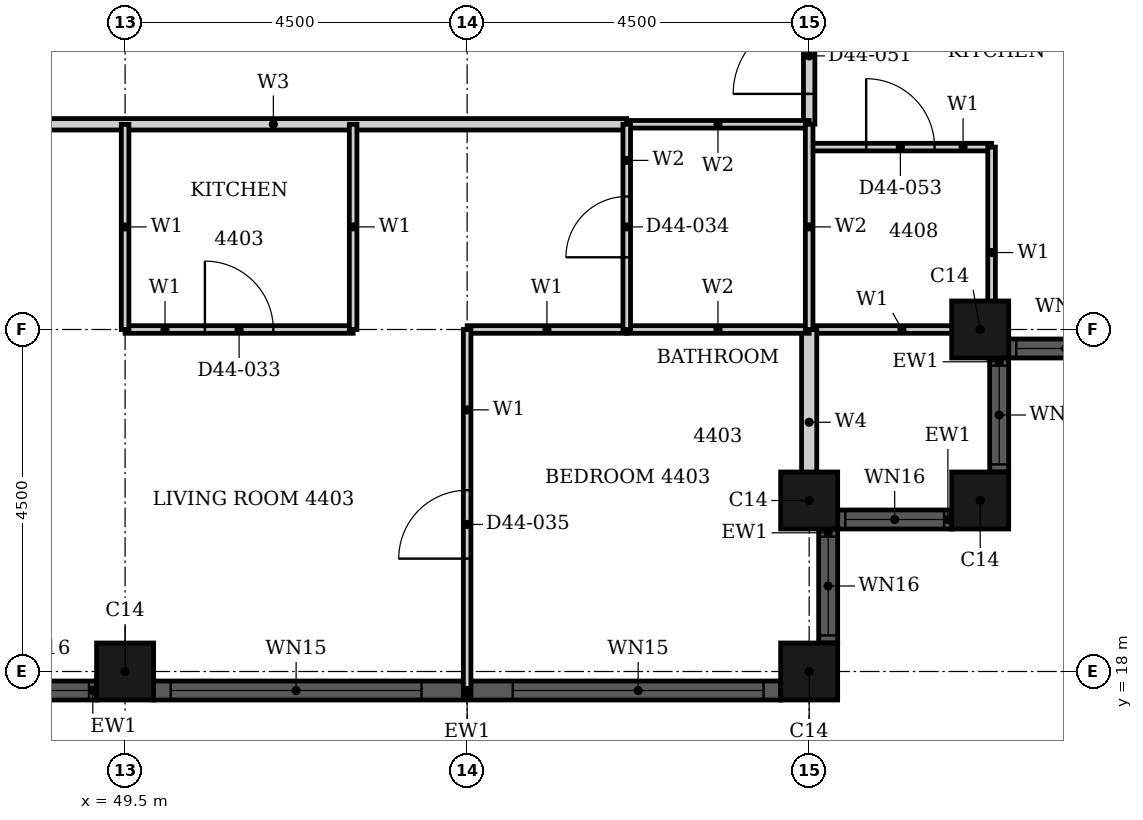
"""IFC4 building model, lengths in metres.
Left out: names, types, materials, properties, quantities, classifications, styles, units other than length and angle.
Written with IfcOpenShell. Run it as: python <this file> out.ifc"""

import sys

from ifc_helpers import new_model, si_unit, direction, frame, frame_2d, origin, origin_2d, place, context, subcontext, project, spatial, rectangle, hollow_rectangle, extrude, element, fill, save


model = new_model("IFC4")
c1 = context("Model", 3, precision=1e-05, world=origin(), true_north=direction((0.0, 1.0)))
c2 = subcontext(c1, "Body", "Model", "MODEL_VIEW")
j1 = project(units=[si_unit("LENGTHUNIT", "METRE"), si_unit("PLANEANGLEUNIT", "RADIAN")], contexts=[c1])
p1 = place(None, origin())
s1 = spatial("IfcSite", under=j1, at=p1, CompositionType="ELEMENT")
p2 = place(p1, origin())
s2 = spatial("IfcBuilding", under=s1, at=p2, CompositionType="ELEMENT")
p3 = place(p2, frame((0.0, 0.0, 176.5)))
s3 = spatial("IfcBuildingStorey", under=s2, at=p3, CompositionType="ELEMENT", Elevation=176.5)
for number, where, z_axis, x_axis in (
    (1, (49.5, 18.0, 0.0), (0.0, 0.0, 1.0), (1.0, 0.0, 0.0)),
    (2, (58.5, 18.0, 0.0), (0.0, 0.0, 1.0), (1.0, 0.0, 0.0)),
    (3, (58.5, 20.25, 0.0), (0.0, 0.0, 1.0), (1.0, 0.0, 0.0)),
    (4, (60.75, 20.25, 0.0), (0.0, 0.0, 1.0), (1.0, 0.0, 0.0)),
    (5, (60.75, 22.5, 0.0), (0.0, 0.0, 1.0), (1.0, 0.0, 0.0)),
):
    element("IfcColumn", number, at=place(p3, frame(where, z_axis=z_axis, x_axis=x_axis)), inside=s3, PredefinedType="COLUMN", context=c2, shape_type="SweptSolid", body=[
        extrude(hollow_rectangle(XDim=0.75, YDim=0.75, WallThickness=0.024, at=origin_2d()), origin(), (0.0, 0.0, 1.0), 3.7),
    ])
p4 = place(p3, frame((47.625, 17.75, 0.0), z_axis=(0.0, 0.0, 1.0), x_axis=(1.0, 0.0, 0.0)))
e6 = element("IfcWall", 6, at=p4, inside=s3, PredefinedType="SOLIDWALL", context=c2, shape_type="SweptSolid", body=[
    extrude(rectangle(XDim=1.5, YDim=0.25, at=frame_2d((0.75, 0.0))), origin(), (0.0, 0.0, 1.0), 3.7),
])
p5 = place(p4, frame((0.1, 0.0, 0.9)))
e7 = element("IfcOpeningElement", 7, at=p5, cuts=e6, PredefinedType="OPENING", context=c2, shape_type="SweptSolid", body=[
    extrude(rectangle(XDim=1.3, YDim=1.85, at=frame_2d((0.65, 0.925))), frame((0.0, 0.135, 0.0), z_axis=(0.0, -1.0, 0.0), x_axis=(1.0, 0.0, 0.0)), (0.0, 0.0, 1.0), 0.27),
])
p6 = place(p3, frame((49.875, 17.75, 0.0), z_axis=(0.0, 0.0, 1.0), x_axis=(1.0, 0.0, 0.0)))
e8 = element("IfcWall", 8, at=p6, inside=s3, PredefinedType="SOLIDWALL", context=c2, shape_type="SweptSolid", body=[
    extrude(rectangle(XDim=8.25, YDim=0.25, at=frame_2d((4.125, 0.0))), origin(), (0.0, 0.0, 1.0), 3.7),
])
p7 = place(p6, frame((0.225, 0.0, 0.45)))
e9 = element("IfcOpeningElement", 9, at=p7, cuts=e8, PredefinedType="OPENING", context=c2, shape_type="SweptSolid", body=[
    extrude(rectangle(XDim=3.3, YDim=2.3, at=frame_2d((1.65, 1.15))), frame((0.0, 0.135, 0.0), z_axis=(0.0, -1.0, 0.0), x_axis=(1.0, 0.0, 0.0)), (0.0, 0.0, 1.0), 0.27),
])
p8 = place(p6, frame((4.725, 0.0, 0.45)))
e10 = element("IfcOpeningElement", 10, at=p8, cuts=e8, PredefinedType="OPENING", context=c2, shape_type="SweptSolid", body=[
    extrude(rectangle(XDim=3.3, YDim=2.3, at=frame_2d((1.65, 1.15))), frame((0.0, 0.135, 0.0), z_axis=(0.0, -1.0, 0.0), x_axis=(1.0, 0.0, 0.0)), (0.0, 0.0, 1.0), 0.27),
])
p9 = place(p3, frame((58.75, 18.375, 0.0), z_axis=(0.0, 0.0, 1.0), x_axis=(0.0, 1.0, 0.0)))
e11 = element("IfcWall", 11, at=p9, inside=s3, PredefinedType="SOLIDWALL", context=c2, shape_type="SweptSolid", body=[
    extrude(rectangle(XDim=1.5, YDim=0.25, at=frame_2d((0.75, 0.0))), origin(), (0.0, 0.0, 1.0), 3.7),
])
p10 = place(p9, frame((0.1, 0.0, 0.9)))
e12 = element("IfcOpeningElement", 12, at=p10, cuts=e11, PredefinedType="OPENING", context=c2, shape_type="SweptSolid", body=[
    extrude(rectangle(XDim=1.3, YDim=1.85, at=frame_2d((0.65, 0.925))), frame((0.0, 0.135, 0.0), z_axis=(0.0, -1.0, 0.0), x_axis=(1.0, 0.0, 0.0)), (0.0, 0.0, 1.0), 0.27),
])
p11 = place(p3, frame((58.875, 20.0, 0.0), z_axis=(0.0, 0.0, 1.0), x_axis=(1.0, 0.0, 0.0)))
e13 = element("IfcWall", 13, at=p11, inside=s3, PredefinedType="SOLIDWALL", context=c2, shape_type="SweptSolid", body=[
    extrude(rectangle(XDim=1.5, YDim=0.25, at=frame_2d((0.75, 0.0))), origin(), (0.0, 0.0, 1.0), 3.7),
])
p12 = place(p11, frame((0.1, 0.0, 0.9)))
e14 = element("IfcOpeningElement", 14, at=p12, cuts=e13, PredefinedType="OPENING", context=c2, shape_type="SweptSolid", body=[
    extrude(rectangle(XDim=1.3, YDim=1.85, at=frame_2d((0.65, 0.925))), frame((0.0, 0.135, 0.0), z_axis=(0.0, -1.0, 0.0), x_axis=(1.0, 0.0, 0.0)), (0.0, 0.0, 1.0), 0.27),
])
p13 = place(p3, frame((61.0, 20.625, 0.0), z_axis=(0.0, 0.0, 1.0), x_axis=(0.0, 1.0, 0.0)))
e15 = element("IfcWall", 15, at=p13, inside=s3, PredefinedType="SOLIDWALL", context=c2, shape_type="SweptSolid", body=[
    extrude(rectangle(XDim=1.5, YDim=0.25, at=frame_2d((0.75, 0.0))), origin(), (0.0, 0.0, 1.0), 3.7),
])
p14 = place(p13, frame((0.1, 0.0, 0.9)))
e16 = element("IfcOpeningElement", 16, at=p14, cuts=e15, PredefinedType="OPENING", context=c2, shape_type="SweptSolid", body=[
    extrude(rectangle(XDim=1.3, YDim=1.85, at=frame_2d((0.65, 0.925))), frame((0.0, 0.135, 0.0), z_axis=(0.0, -1.0, 0.0), x_axis=(1.0, 0.0, 0.0)), (0.0, 0.0, 1.0), 0.27),
])
p15 = place(p3, frame((61.125, 22.25, 0.0), z_axis=(0.0, 0.0, 1.0), x_axis=(1.0, 0.0, 0.0)))
e17 = element("IfcWall", 17, at=p15, inside=s3, PredefinedType="SOLIDWALL", context=c2, shape_type="SweptSolid", body=[
    extrude(rectangle(XDim=1.5, YDim=0.25, at=frame_2d((0.75, 0.0))), origin(), (0.0, 0.0, 1.0), 3.7),
])
p16 = place(p15, frame((0.1, 0.0, 0.9)))
e18 = element("IfcOpeningElement", 18, at=p16, cuts=e17, PredefinedType="OPENING", context=c2, shape_type="SweptSolid", body=[
    extrude(rectangle(XDim=1.3, YDim=1.85, at=frame_2d((0.65, 0.925))), frame((0.0, 0.135, 0.0), z_axis=(0.0, -1.0, 0.0), x_axis=(1.0, 0.0, 0.0)), (0.0, 0.0, 1.0), 0.27),
])
p17 = place(p3, frame((46.801, 25.2, 0.0), z_axis=(0.0, 0.0, 1.0), x_axis=(1.0, 0.0, 0.0)))
e19 = element("IfcWall", 19, at=p17, inside=s3, PredefinedType="PARTITIONING", context=c2, shape_type="SweptSolid", body=[
    extrude(rectangle(XDim=9.299, YDim=0.15, at=frame_2d((4.649, 0.0))), origin(), (0.0, 0.0, 1.0), 3.4),
])
p18 = place(p3, frame((58.5, 25.2, 0.0), z_axis=(0.0, 0.0, 1.0), x_axis=(0.0, 1.0, 0.0)))
e20 = element("IfcWall", 20, at=p18, inside=s3, PredefinedType="PARTITIONING", context=c2, shape_type="SweptSolid", body=[
    extrude(rectangle(XDim=1.8, YDim=0.15, at=frame_2d((0.9, 0.0))), origin(), (0.0, 0.0, 1.0), 3.4),
])
p19 = place(p18, frame((0.4, 0.0, 0.0)))
e21 = element("IfcOpeningElement", 21, at=p19, cuts=e20, PredefinedType="OPENING", context=c2, shape_type="SweptSolid", body=[
    extrude(rectangle(XDim=1.0, YDim=2.2, at=frame_2d((0.5, 1.1))), frame((0.0, 0.085, 0.0), z_axis=(0.0, -1.0, 0.0), x_axis=(1.0, 0.0, 0.0)), (0.0, 0.0, 1.0), 0.17),
])
p20 = place(p3, frame((54.0, 22.5, 0.0), z_axis=(0.0, 0.0, 1.0), x_axis=(1.0, 0.0, 0.0)))
e22 = element("IfcWall", 22, at=p20, inside=s3, PredefinedType="PARTITIONING", context=c2, shape_type="SweptSolid", body=[
    extrude(rectangle(XDim=2.1, YDim=0.1, at=frame_2d((1.05, 0.0))), origin(), (0.0, 0.0, 1.0), 2.68),
])
p21 = place(p3, frame((49.5, 22.5, 0.0), z_axis=(0.0, 0.0, 1.0), x_axis=(1.0, 0.0, 0.0)))
e23 = element("IfcWall", 23, at=p21, inside=s3, PredefinedType="PARTITIONING", context=c2, shape_type="SweptSolid", body=[
    extrude(rectangle(XDim=3.0, YDim=0.1, at=frame_2d((1.5, 0.0))), origin(), (0.0, 0.0, 1.0), 2.68),
])
p22 = place(p21, frame((1.05, 0.0, 0.0)))
e24 = element("IfcOpeningElement", 24, at=p22, cuts=e23, PredefinedType="OPENING", context=c2, shape_type="SweptSolid", body=[
    extrude(rectangle(XDim=0.9, YDim=2.1, at=frame_2d((0.45, 1.05))), frame((0.0, 0.06, 0.0), z_axis=(0.0, -1.0, 0.0), x_axis=(1.0, 0.0, 0.0)), (0.0, 0.0, 1.0), 0.12),
])
p23 = place(p3, frame((58.501, 22.5, 0.0), z_axis=(0.0, 0.0, 1.0), x_axis=(1.0, 0.0, 0.0)))
e25 = element("IfcWall", 25, at=p23, inside=s3, PredefinedType="PARTITIONING", context=c2, shape_type="SweptSolid", body=[
    extrude(rectangle(XDim=2.439, YDim=0.1, at=frame_2d((1.219, 0.0))), origin(), (0.0, 0.0, 1.0), 2.68),
])
p24 = place(p3, frame((58.5, 24.9, 0.0), z_axis=(0.0, 0.0, 1.0), x_axis=(1.0, 0.0, 0.0)))
e26 = element("IfcWall", 26, at=p24, inside=s3, PredefinedType="PARTITIONING", context=c2, shape_type="SweptSolid", body=[
    extrude(rectangle(XDim=2.4, YDim=0.1, at=frame_2d((1.2, 0.0))), origin(), (0.0, 0.0, 1.0), 3.4),
])
p25 = place(p24, frame((0.75, 0.0, 0.0)))
e27 = element("IfcOpeningElement", 27, at=p25, cuts=e26, PredefinedType="OPENING", context=c2, shape_type="SweptSolid", body=[
    extrude(rectangle(XDim=0.9, YDim=2.1, at=frame_2d((0.45, 1.05))), frame((0.0, 0.06, 0.0), z_axis=(0.0, -1.0, 0.0), x_axis=(1.0, 0.0, 0.0)), (0.0, 0.0, 1.0), 0.12),
])
p26 = place(p3, frame((49.5, 22.5, 0.0), z_axis=(0.0, 0.0, 1.0), x_axis=(0.0, 1.0, 0.0)))
e28 = element("IfcWall", 28, at=p26, inside=s3, PredefinedType="PARTITIONING", context=c2, shape_type="SweptSolid", body=[
    extrude(rectangle(XDim=2.699, YDim=0.1, at=frame_2d((1.35, 0.0))), origin(), (0.0, 0.0, 1.0), 2.48),
])
p27 = place(p3, frame((52.5, 22.5, 0.0), z_axis=(0.0, 0.0, 1.0), x_axis=(0.0, 1.0, 0.0)))
e29 = element("IfcWall", 29, at=p27, inside=s3, PredefinedType="PARTITIONING", context=c2, shape_type="SweptSolid", body=[
    extrude(rectangle(XDim=2.7, YDim=0.1, at=frame_2d((1.35, 0.0))), origin(), (0.0, 0.0, 1.0), 3.4),
])
p28 = place(p3, frame((54.0, 17.685, 0.0), z_axis=(0.0, 0.0, 1.0), x_axis=(0.0, 1.0, 0.0)))
e30 = element("IfcWall", 30, at=p28, inside=s3, PredefinedType="PARTITIONING", context=c2, shape_type="SweptSolid", body=[
    extrude(rectangle(XDim=4.815, YDim=0.1, at=frame_2d((2.407, 0.0))), origin(), (0.0, 0.0, 1.0), 3.4),
])
p29 = place(p28, frame((1.8, 0.0, 0.0)))
e31 = element("IfcOpeningElement", 31, at=p29, cuts=e30, PredefinedType="OPENING", context=c2, shape_type="SweptSolid", body=[
    extrude(rectangle(XDim=0.9, YDim=2.1, at=frame_2d((0.45, 1.05))), frame((0.0, 0.06, 0.0), z_axis=(0.0, -1.0, 0.0), x_axis=(1.0, 0.0, 0.0)), (0.0, 0.0, 1.0), 0.12),
])
p30 = place(p3, frame((60.9, 22.125, 0.0), z_axis=(0.0, 0.0, 1.0), x_axis=(0.0, 1.0, 0.0)))
e32 = element("IfcWall", 32, at=p30, inside=s3, PredefinedType="PARTITIONING", context=c2, shape_type="SweptSolid", body=[
    extrude(rectangle(XDim=2.775, YDim=0.1, at=frame_2d((1.387, 0.0))), origin(), (0.0, 0.0, 1.0), 3.4),
])
p31 = place(p3, frame((58.5, 20.06, 0.0), z_axis=(0.0, 0.0, 1.0), x_axis=(0.0, 1.0, 0.0)))
e33 = element("IfcWall", 33, at=p31, inside=s3, PredefinedType="PARTITIONING", context=c2, shape_type="SweptSolid", body=[
    extrude(rectangle(XDim=2.439, YDim=0.2, at=frame_2d((1.219, 0.0))), origin(), (0.0, 0.0, 1.0), 3.4),
])
p32 = place(p3, frame((56.1, 22.5, 0.0), z_axis=(0.0, 0.0, 1.0), x_axis=(1.0, 0.0, 0.0)))
e34 = element("IfcWall", 34, at=p32, inside=s3, PredefinedType="PARTITIONING", context=c2, shape_type="SweptSolid", body=[
    extrude(rectangle(XDim=2.4, YDim=0.1, at=frame_2d((1.2, 0.0))), origin(), (0.0, 0.0, 1.0), 2.68),
])
p33 = place(p3, frame((56.1, 25.2, 0.0), z_axis=(0.0, 0.0, 1.0), x_axis=(1.0, 0.0, 0.0)))
e35 = element("IfcWall", 35, at=p33, inside=s3, PredefinedType="PARTITIONING", context=c2, shape_type="SweptSolid", body=[
    extrude(rectangle(XDim=2.4, YDim=0.1, at=frame_2d((1.2, 0.0))), origin(), (0.0, 0.0, 1.0), 3.4),
])
p34 = place(p3, frame((56.1, 22.5, 0.0), z_axis=(0.0, 0.0, 1.0), x_axis=(0.0, 1.0, 0.0)))
e36 = element("IfcWall", 36, at=p34, inside=s3, PredefinedType="PARTITIONING", context=c2, shape_type="SweptSolid", body=[
    extrude(rectangle(XDim=2.7, YDim=0.1, at=frame_2d((1.35, 0.0))), origin(), (0.0, 0.0, 1.0), 3.4),
])
p35 = place(p34, frame((0.95, 0.0, 0.0)))
e37 = element("IfcOpeningElement", 37, at=p35, cuts=e36, PredefinedType="OPENING", context=c2, shape_type="SweptSolid", body=[
    extrude(rectangle(XDim=0.8, YDim=2.1, at=frame_2d((0.4, 1.05))), frame((0.0, 0.06, 0.0), z_axis=(0.0, -1.0, 0.0), x_axis=(1.0, 0.0, 0.0)), (0.0, 0.0, 1.0), 0.12),
])
p36 = place(p3, frame((58.5, 22.5, 0.0), z_axis=(0.0, 0.0, 1.0), x_axis=(0.0, 1.0, 0.0)))
e38 = element("IfcWall", 38, at=p36, inside=s3, PredefinedType="PARTITIONING", context=c2, shape_type="SweptSolid", body=[
    extrude(rectangle(XDim=2.7, YDim=0.1, at=frame_2d((1.35, 0.0))), origin(), (0.0, 0.0, 1.0), 3.4),
])
p37 = place(p5, origin())
e39 = element("IfcWindow", 39, at=p37, inside=s3, PartitioningType="SINGLE_PANEL", PredefinedType="WINDOW", context=c2, shape_type="SweptSolid", body=[
    extrude(rectangle(XDim=1.3, YDim=1.85, at=frame_2d((0.65, 0.925))), frame((0.0, 0.03, 0.0), z_axis=(0.0, -1.0, 0.0), x_axis=(1.0, 0.0, 0.0)), (0.0, 0.0, 1.0), 0.06),
])
fill(e7, e39)
p38 = place(p7, origin())
e40 = element("IfcWindow", 40, at=p38, inside=s3, PartitioningType="SINGLE_PANEL", PredefinedType="WINDOW", context=c2, shape_type="SweptSolid", body=[
    extrude(rectangle(XDim=3.3, YDim=2.3, at=frame_2d((1.65, 1.15))), frame((0.0, 0.03, 0.0), z_axis=(0.0, -1.0, 0.0), x_axis=(1.0, 0.0, 0.0)), (0.0, 0.0, 1.0), 0.06),
])
fill(e9, e40)
p39 = place(p8, origin())
e41 = element("IfcWindow", 41, at=p39, inside=s3, PartitioningType="SINGLE_PANEL", PredefinedType="WINDOW", context=c2, shape_type="SweptSolid", body=[
    extrude(rectangle(XDim=3.3, YDim=2.3, at=frame_2d((1.65, 1.15))), frame((0.0, 0.03, 0.0), z_axis=(0.0, -1.0, 0.0), x_axis=(1.0, 0.0, 0.0)), (0.0, 0.0, 1.0), 0.06),
])
fill(e10, e41)
p40 = place(p10, origin())
e42 = element("IfcWindow", 42, at=p40, inside=s3, PartitioningType="SINGLE_PANEL", PredefinedType="WINDOW", context=c2, shape_type="SweptSolid", body=[
    extrude(rectangle(XDim=1.3, YDim=1.85, at=frame_2d((0.65, 0.925))), frame((0.0, 0.03, 0.0), z_axis=(0.0, -1.0, 0.0), x_axis=(1.0, 0.0, 0.0)), (0.0, 0.0, 1.0), 0.06),
])
fill(e12, e42)
p41 = place(p12, origin())
e43 = element("IfcWindow", 43, at=p41, inside=s3, PartitioningType="SINGLE_PANEL", PredefinedType="WINDOW", context=c2, shape_type="SweptSolid", body=[
    extrude(rectangle(XDim=1.3, YDim=1.85, at=frame_2d((0.65, 0.925))), frame((0.0, 0.03, 0.0), z_axis=(0.0, -1.0, 0.0), x_axis=(1.0, 0.0, 0.0)), (0.0, 0.0, 1.0), 0.06),
])
fill(e14, e43)
p42 = place(p14, origin())
e44 = element("IfcWindow", 44, at=p42, inside=s3, PartitioningType="SINGLE_PANEL", PredefinedType="WINDOW", context=c2, shape_type="SweptSolid", body=[
    extrude(rectangle(XDim=1.3, YDim=1.85, at=frame_2d((0.65, 0.925))), frame((0.0, 0.03, 0.0), z_axis=(0.0, -1.0, 0.0), x_axis=(1.0, 0.0, 0.0)), (0.0, 0.0, 1.0), 0.06),
])
fill(e16, e44)
p43 = place(p16, origin())
e45 = element("IfcWindow", 45, at=p43, inside=s3, PartitioningType="SINGLE_PANEL", PredefinedType="WINDOW", context=c2, shape_type="SweptSolid", body=[
    extrude(rectangle(XDim=1.3, YDim=1.85, at=frame_2d((0.65, 0.925))), frame((0.0, 0.03, 0.0), z_axis=(0.0, -1.0, 0.0), x_axis=(1.0, 0.0, 0.0)), (0.0, 0.0, 1.0), 0.06),
])
fill(e18, e45)
p44 = place(p22, origin())
e46 = element("IfcDoor", 46, at=p44, inside=s3, OperationType="SINGLE_SWING_LEFT", PredefinedType="DOOR", context=c2, shape_type="SweptSolid", body=[
    extrude(rectangle(XDim=0.9, YDim=2.1, at=frame_2d((0.45, 1.05))), frame((0.0, 0.025, 0.0), z_axis=(0.0, -1.0, 0.0), x_axis=(1.0, 0.0, 0.0)), (0.0, 0.0, 1.0), 0.05),
])
fill(e24, e46)
p45 = place(p35, origin())
e47 = element("IfcDoor", 47, at=p45, inside=s3, OperationType="SINGLE_SWING_LEFT", PredefinedType="DOOR", context=c2, shape_type="SweptSolid", body=[
    extrude(rectangle(XDim=0.8, YDim=2.1, at=frame_2d((0.4, 1.05))), frame((0.0, 0.025, 0.0), z_axis=(0.0, -1.0, 0.0), x_axis=(1.0, 0.0, 0.0)), (0.0, 0.0, 1.0), 0.05),
])
fill(e37, e47)
p46 = place(p29, origin())
e48 = element("IfcDoor", 48, at=p46, inside=s3, OperationType="SINGLE_SWING_LEFT", PredefinedType="DOOR", context=c2, shape_type="SweptSolid", body=[
    extrude(rectangle(XDim=0.9, YDim=2.1, at=frame_2d((0.45, 1.05))), frame((0.0, 0.025, 0.0), z_axis=(0.0, -1.0, 0.0), x_axis=(1.0, 0.0, 0.0)), (0.0, 0.0, 1.0), 0.05),
])
fill(e31, e48)
p47 = place(p19, origin())
e49 = element("IfcDoor", 49, at=p47, inside=s3, OperationType="SINGLE_SWING_RIGHT", PredefinedType="DOOR", context=c2, shape_type="SweptSolid", body=[
    extrude(rectangle(XDim=1.0, YDim=2.2, at=frame_2d((0.5, 1.1))), frame((0.0, 0.025, 0.0), z_axis=(0.0, -1.0, 0.0), x_axis=(1.0, 0.0, 0.0)), (0.0, 0.0, 1.0), 0.05),
])
fill(e21, e49)
p48 = place(p25, origin())
e50 = element("IfcDoor", 50, at=p48, inside=s3, OperationType="SINGLE_SWING_LEFT", PredefinedType="DOOR", context=c2, shape_type="SweptSolid", body=[
    extrude(rectangle(XDim=0.9, YDim=2.1, at=frame_2d((0.45, 1.05))), frame((0.0, 0.025, 0.0), z_axis=(0.0, -1.0, 0.0), x_axis=(1.0, 0.0, 0.0)), (0.0, 0.0, 1.0), 0.05),
])
fill(e27, e50)
save(model, sys.argv[1])
